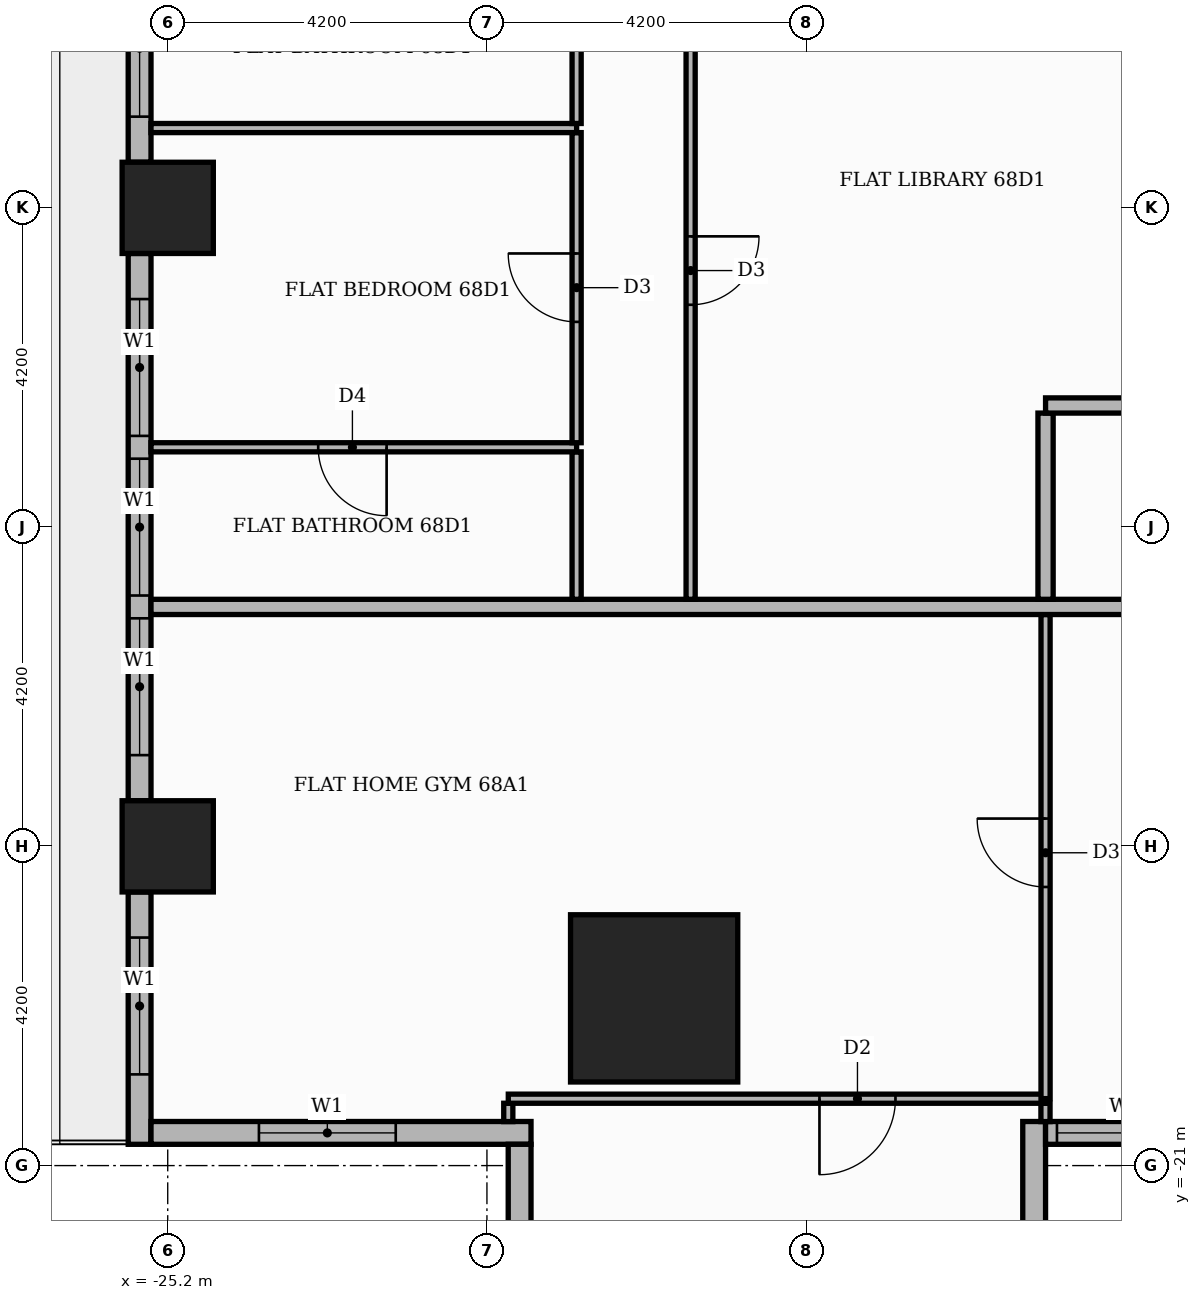
"""IFC4 building model, lengths in metres.
Left out: names, types, materials, properties, quantities, classifications, styles, units other than length and angle.
Written with IfcOpenShell. Run it as: python <this file> out.ifc"""

import sys

from ifc_helpers import new_model, si_unit, direction, frame, frame_2d, origin, origin_2d, place, context, subcontext, project, spatial, rectangle, extrude, element, fill, save


model = new_model("IFC4")
c1 = context("Model", 3, precision=1e-05, world=origin(), true_north=direction((0.0, 1.0)))
c2 = subcontext(c1, "Body", "Model", "MODEL_VIEW")
j1 = project(units=[si_unit("LENGTHUNIT", "METRE"), si_unit("PLANEANGLEUNIT", "RADIAN")], contexts=[c1])
p1 = place(None, origin())
s1 = spatial("IfcSite", under=j1, at=p1, CompositionType="ELEMENT")
p2 = place(p1, origin())
s2 = spatial("IfcBuilding", under=s1, at=p2, CompositionType="ELEMENT")
p3 = place(p2, frame((0.0, 0.0, 283.5)))
s3 = spatial("IfcBuildingStorey", under=s2, at=p3, CompositionType="ELEMENT", Elevation=283.5)
p4 = place(p3, frame((-18.8, -18.8, 0.0), z_axis=(0.0, 0.0, 1.0), x_axis=(1.0, 0.0, 0.0)))
e1 = element("IfcColumn", 1, at=p4, inside=s3, PredefinedType="COLUMN", context=c2, shape_type="SweptSolid", body=[
    extrude(rectangle(XDim=2.2, YDim=2.2, at=origin_2d()), origin(), (0.0, 0.0, 1.0), 3.9),
])
for number, where, z_axis, x_axis in (
    (2, (-25.2, -8.4, 0.0), (0.0, 0.0, 1.0), (1.0, 0.0, 0.0)),
    (3, (-25.2, -16.8, 0.0), (0.0, 0.0, 1.0), (1.0, 0.0, 0.0)),
):
    element("IfcColumn", number, at=place(p3, frame(where, z_axis=z_axis, x_axis=x_axis)), inside=s3, PredefinedType="COLUMN", context=c2, shape_type="SweptSolid", body=[
        extrude(rectangle(XDim=1.2, YDim=1.2, at=origin_2d()), origin(), (0.0, 0.0, 1.0), 3.9),
    ])
p5 = place(p3, frame((-25.57, -0.6, 0.0), z_axis=(0.0, 0.0, 1.0), x_axis=(0.0, -1.0, 0.0)))
e4 = element("IfcWall", 4, at=p5, inside=s3, PredefinedType="STANDARD", context=c2, shape_type="SweptSolid", body=[
    extrude(rectangle(XDim=7.2, YDim=0.3, at=frame_2d((3.6, 0.0))), origin(), (0.0, 0.0, 1.0), 3.4),
])
p6 = place(p5, frame((0.6, 0.0, 0.9)))
e5 = element("IfcOpeningElement", 5, at=p6, cuts=e4, PredefinedType="OPENING", context=c2, shape_type="SweptSolid", body=[
    extrude(rectangle(XDim=3.9, YDim=2.1, at=frame_2d((1.95, 1.05))), frame((0.0, 0.16, 0.0), z_axis=(0.0, -1.0, 0.0), x_axis=(1.0, 0.0, 0.0)), (0.0, 0.0, 1.0), 0.32),
])
p7 = place(p5, frame((4.8, 0.0, 0.9)))
e6 = element("IfcOpeningElement", 6, at=p7, cuts=e4, PredefinedType="OPENING", context=c2, shape_type="SweptSolid", body=[
    extrude(rectangle(XDim=1.8, YDim=2.1, at=frame_2d((0.9, 1.05))), frame((0.0, 0.16, 0.0), z_axis=(0.0, -1.0, 0.0), x_axis=(1.0, 0.0, 0.0)), (0.0, 0.0, 1.0), 0.32),
])
p8 = place(p3, frame((-25.57, -9.0, 0.0), z_axis=(0.0, 0.0, 1.0), x_axis=(0.0, -1.0, 0.0)))
e7 = element("IfcWall", 7, at=p8, inside=s3, PredefinedType="STANDARD", context=c2, shape_type="SweptSolid", body=[
    extrude(rectangle(XDim=7.2, YDim=0.3, at=frame_2d((3.6, 0.0))), origin(), (0.0, 0.0, 1.0), 3.4),
])
p9 = place(p8, frame((0.6, 0.0, 0.9)))
e8 = element("IfcOpeningElement", 8, at=p9, cuts=e7, PredefinedType="OPENING", context=c2, shape_type="SweptSolid", body=[
    extrude(rectangle(XDim=1.8, YDim=2.1, at=frame_2d((0.9, 1.05))), frame((0.0, 0.16, 0.0), z_axis=(0.0, -1.0, 0.0), x_axis=(1.0, 0.0, 0.0)), (0.0, 0.0, 1.0), 0.32),
])
p10 = place(p8, frame((2.7, 0.0, 0.9)))
e9 = element("IfcOpeningElement", 9, at=p10, cuts=e7, PredefinedType="OPENING", context=c2, shape_type="SweptSolid", body=[
    extrude(rectangle(XDim=1.8, YDim=2.1, at=frame_2d((0.9, 1.05))), frame((0.0, 0.16, 0.0), z_axis=(0.0, -1.0, 0.0), x_axis=(1.0, 0.0, 0.0)), (0.0, 0.0, 1.0), 0.32),
])
p11 = place(p8, frame((4.8, 0.0, 0.9)))
e10 = element("IfcOpeningElement", 10, at=p11, cuts=e7, PredefinedType="OPENING", context=c2, shape_type="SweptSolid", body=[
    extrude(rectangle(XDim=1.8, YDim=2.1, at=frame_2d((0.9, 1.05))), frame((0.0, 0.16, 0.0), z_axis=(0.0, -1.0, 0.0), x_axis=(1.0, 0.0, 0.0)), (0.0, 0.0, 1.0), 0.32),
])
p12 = place(p3, frame((-25.57, -17.4, 0.0), z_axis=(0.0, 0.0, 1.0), x_axis=(0.0, -1.0, 0.0)))
e11 = element("IfcWall", 11, at=p12, inside=s3, PredefinedType="STANDARD", context=c2, shape_type="SweptSolid", body=[
    extrude(rectangle(XDim=3.32, YDim=0.3, at=frame_2d((1.66, 0.0))), origin(), (0.0, 0.0, 1.0), 3.4),
])
p13 = place(p12, frame((0.6, 0.0, 0.9)))
e12 = element("IfcOpeningElement", 12, at=p13, cuts=e11, PredefinedType="OPENING", context=c2, shape_type="SweptSolid", body=[
    extrude(rectangle(XDim=1.8, YDim=2.1, at=frame_2d((0.9, 1.05))), frame((0.0, 0.16, 0.0), z_axis=(0.0, -1.0, 0.0), x_axis=(1.0, 0.0, 0.0)), (0.0, 0.0, 1.0), 0.32),
])
p14 = place(p3, frame((-25.42, -20.57, 0.0), z_axis=(0.0, 0.0, 1.0), x_axis=(1.0, 0.0, 0.0)))
e13 = element("IfcWall", 13, at=p14, inside=s3, PredefinedType="STANDARD", context=c2, shape_type="SweptSolid", body=[
    extrude(rectangle(XDim=5.0, YDim=0.3, at=frame_2d((2.5, 0.0))), origin(), (0.0, 0.0, 1.0), 3.4),
])
p15 = place(p14, frame((1.42, 0.0, 0.9)))
e14 = element("IfcOpeningElement", 14, at=p15, cuts=e13, PredefinedType="OPENING", context=c2, shape_type="SweptSolid", body=[
    extrude(rectangle(XDim=1.8, YDim=2.1, at=frame_2d((0.9, 1.05))), frame((0.0, 0.16, 0.0), z_axis=(0.0, -1.0, 0.0), x_axis=(1.0, 0.0, 0.0)), (0.0, 0.0, 1.0), 0.32),
])
p16 = place(p3, frame((-20.57, -20.72, 0.0), z_axis=(0.0, 0.0, 1.0), x_axis=(0.0, -1.0, 0.0)))
e15 = element("IfcWall", 15, at=p16, inside=s3, PredefinedType="STANDARD", context=c2, shape_type="SweptSolid", body=[
    extrude(rectangle(XDim=5.0, YDim=0.3, at=frame_2d((2.5, 0.0))), origin(), (0.0, 0.0, 1.0), 3.4),
])
p17 = place(p16, frame((1.48, 0.0, 0.9)))
e16 = element("IfcOpeningElement", 16, at=p17, cuts=e15, PredefinedType="OPENING", context=c2, shape_type="SweptSolid", body=[
    extrude(rectangle(XDim=1.8, YDim=2.1, at=frame_2d((0.9, 1.05))), frame((0.0, 0.16, 0.0), z_axis=(0.0, -1.0, 0.0), x_axis=(1.0, 0.0, 0.0)), (0.0, 0.0, 1.0), 0.32),
])
p18 = place(p3, frame((-13.8, -25.42, 0.0), z_axis=(0.0, 0.0, 1.0), x_axis=(0.0, 1.0, 0.0)))
e17 = element("IfcWall", 17, at=p18, inside=s3, PredefinedType="STANDARD", context=c2, shape_type="SweptSolid", body=[
    extrude(rectangle(XDim=5.0, YDim=0.3, at=frame_2d((2.5, 0.0))), origin(), (0.0, 0.0, 1.0), 3.4),
])
p19 = place(p18, frame((1.42, 0.0, 0.9)))
e18 = element("IfcOpeningElement", 18, at=p19, cuts=e17, PredefinedType="OPENING", context=c2, shape_type="SweptSolid", body=[
    extrude(rectangle(XDim=1.8, YDim=2.1, at=frame_2d((0.9, 1.05))), frame((0.0, 0.16, 0.0), z_axis=(0.0, -1.0, 0.0), x_axis=(1.0, 0.0, 0.0)), (0.0, 0.0, 1.0), 0.32),
])
p20 = place(p3, frame((-13.65, -20.57, 0.0), z_axis=(0.0, 0.0, 1.0), x_axis=(1.0, 0.0, 0.0)))
e19 = element("IfcWall", 19, at=p20, inside=s3, PredefinedType="STANDARD", context=c2, shape_type="SweptSolid", body=[
    extrude(rectangle(XDim=27.6, YDim=0.3, at=frame_2d((13.8, 0.0))), origin(), (0.0, 0.0, 1.0), 3.4),
])
p21 = place(p20, frame((0.15, 0.0, 0.9)))
e20 = element("IfcOpeningElement", 20, at=p21, cuts=e19, PredefinedType="OPENING", context=c2, shape_type="SweptSolid", body=[
    extrude(rectangle(XDim=1.8, YDim=2.1, at=frame_2d((0.9, 1.05))), frame((0.0, 0.16, 0.0), z_axis=(0.0, -1.0, 0.0), x_axis=(1.0, 0.0, 0.0)), (0.0, 0.0, 1.0), 0.32),
])
p22 = place(p20, frame((2.25, 0.0, 0.9)))
e21 = element("IfcOpeningElement", 21, at=p22, cuts=e19, PredefinedType="OPENING", context=c2, shape_type="SweptSolid", body=[
    extrude(rectangle(XDim=6.0, YDim=2.1, at=frame_2d((3.0, 1.05))), frame((0.0, 0.16, 0.0), z_axis=(0.0, -1.0, 0.0), x_axis=(1.0, 0.0, 0.0)), (0.0, 0.0, 1.0), 0.32),
])
p23 = place(p20, frame((8.55, 0.0, 0.9)))
e22 = element("IfcOpeningElement", 22, at=p23, cuts=e19, PredefinedType="OPENING", context=c2, shape_type="SweptSolid", body=[
    extrude(rectangle(XDim=6.0, YDim=2.1, at=frame_2d((3.0, 1.05))), frame((0.0, 0.16, 0.0), z_axis=(0.0, -1.0, 0.0), x_axis=(1.0, 0.0, 0.0)), (0.0, 0.0, 1.0), 0.32),
])
p24 = place(p20, frame((14.85, 0.0, 0.9)))
e23 = element("IfcOpeningElement", 23, at=p24, cuts=e19, PredefinedType="OPENING", context=c2, shape_type="SweptSolid", body=[
    extrude(rectangle(XDim=6.0, YDim=2.1, at=frame_2d((3.0, 1.05))), frame((0.0, 0.16, 0.0), z_axis=(0.0, -1.0, 0.0), x_axis=(1.0, 0.0, 0.0)), (0.0, 0.0, 1.0), 0.32),
])
p25 = place(p20, frame((21.15, 0.0, 0.9)))
e24 = element("IfcOpeningElement", 24, at=p25, cuts=e19, PredefinedType="OPENING", context=c2, shape_type="SweptSolid", body=[
    extrude(rectangle(XDim=6.0, YDim=2.1, at=frame_2d((3.0, 1.05))), frame((0.0, 0.16, 0.0), z_axis=(0.0, -1.0, 0.0), x_axis=(1.0, 0.0, 0.0)), (0.0, 0.0, 1.0), 0.32),
])
for number, where, z_axis, x_axis in (
    (25, (-20.719, -20.421, 0.0), (0.0, 0.0, 1.0), (0.0, 1.0, 0.0)),
    (26, (-13.651, -20.421, 0.0), (0.0, 0.0, 1.0), (0.0, 1.0, 0.0)),
):
    element("IfcWall", number, at=place(p3, frame(where, z_axis=z_axis, x_axis=x_axis)), inside=s3, PredefinedType="PARTITIONING", context=c2, shape_type="SweptSolid", body=[
        extrude(rectangle(XDim=0.241, YDim=0.12, at=frame_2d((0.121, 0.0))), origin(), (0.0, 0.0, 1.0), 3.4),
    ])
p26 = place(p3, frame((-20.719, -20.12, 0.0), z_axis=(0.0, 0.0, 1.0), x_axis=(1.0, 0.0, 0.0)))
e27 = element("IfcWall", 27, at=p26, inside=s3, PredefinedType="PARTITIONING", context=c2, shape_type="SweptSolid", body=[
    extrude(rectangle(XDim=7.068, YDim=0.12, at=frame_2d((3.534, 0.0))), origin(), (0.0, 0.0, 1.0), 3.4),
])
p27 = place(p26, frame((4.094, 0.0, 0.0)))
e28 = element("IfcOpeningElement", 28, at=p27, cuts=e27, PredefinedType="OPENING", context=c2, shape_type="SweptSolid", body=[
    extrude(rectangle(XDim=1.0, YDim=2.1, at=frame_2d((0.5, 1.05))), frame((0.0, 0.07, 0.0), z_axis=(0.0, -1.0, 0.0), x_axis=(1.0, 0.0, 0.0)), (0.0, 0.0, 1.0), 0.14),
])
p28 = place(p3, frame((-13.65, -20.119, 0.0), z_axis=(0.0, 0.0, 1.0), x_axis=(0.0, 1.0, 0.0)))
e29 = element("IfcWall", 29, at=p28, inside=s3, PredefinedType="PARTITIONING", context=c2, shape_type="SweptSolid", body=[
    extrude(rectangle(XDim=6.369, YDim=0.12, at=frame_2d((3.185, 0.0))), origin(), (0.0, 0.0, 1.0), 3.4),
])
p29 = place(p28, frame((2.784, 0.0, 0.0)))
e30 = element("IfcOpeningElement", 30, at=p29, cuts=e29, PredefinedType="OPENING", context=c2, shape_type="SweptSolid", body=[
    extrude(rectangle(XDim=0.9, YDim=2.1, at=frame_2d((0.45, 1.05))), frame((0.0, 0.07, 0.0), z_axis=(0.0, -1.0, 0.0), x_axis=(1.0, 0.0, 0.0)), (0.0, 0.0, 1.0), 0.14),
])
p30 = place(p3, frame((-25.42, -13.65, 0.0), z_axis=(0.0, 0.0, 1.0), x_axis=(1.0, 0.0, 0.0)))
e31 = element("IfcWall", 31, at=p30, inside=s3, PredefinedType="PARTITIONING", context=c2, shape_type="SweptSolid", body=[
    extrude(rectangle(XDim=39.07, YDim=0.2, at=frame_2d((19.535, 0.0))), origin(), (0.0, 0.0, 1.0), 3.4),
])
p31 = place(p30, frame((14.37, 0.0, 0.0)))
e32 = element("IfcOpeningElement", 32, at=p31, cuts=e31, PredefinedType="OPENING", context=c2, shape_type="SweptSolid", body=[
    extrude(rectangle(XDim=1.1, YDim=2.4, at=frame_2d((0.55, 1.2))), frame((0.0, 0.11, 0.0), z_axis=(0.0, -1.0, 0.0), x_axis=(1.0, 0.0, 0.0)), (0.0, 0.0, 1.0), 0.22),
])
p32 = place(p3, frame((-19.82, -13.55, 0.0), z_axis=(0.0, 0.0, 1.0), x_axis=(0.0, 1.0, 0.0)))
e33 = element("IfcWall", 33, at=p32, inside=s3, PredefinedType="PARTITIONING", context=c2, shape_type="SweptSolid", body=[
    extrude(rectangle(XDim=1.94, YDim=0.12, at=frame_2d((0.97, 0.0))), origin(), (0.0, 0.0, 1.0), 3.4),
])
p33 = place(p3, frame((-18.32, -13.55, 0.0), z_axis=(0.0, 0.0, 1.0), x_axis=(0.0, 1.0, 0.0)))
e34 = element("IfcWall", 34, at=p33, inside=s3, PredefinedType="PARTITIONING", context=c2, shape_type="SweptSolid", body=[
    extrude(rectangle(XDim=8.69, YDim=0.12, at=frame_2d((4.345, 0.0))), origin(), (0.0, 0.0, 1.0), 3.4),
])
p34 = place(p33, frame((3.875, 0.0, 0.0)))
e35 = element("IfcOpeningElement", 35, at=p34, cuts=e34, PredefinedType="OPENING", context=c2, shape_type="SweptSolid", body=[
    extrude(rectangle(XDim=0.9, YDim=2.1, at=frame_2d((0.45, 1.05))), frame((0.0, 0.07, 0.0), z_axis=(0.0, -1.0, 0.0), x_axis=(1.0, 0.0, 0.0)), (0.0, 0.0, 1.0), 0.14),
])
p35 = place(p3, frame((-13.65, -13.55, 0.0), z_axis=(0.0, 0.0, 1.0), x_axis=(0.0, 1.0, 0.0)))
e36 = element("IfcWall", 36, at=p35, inside=s3, PredefinedType="PARTITIONING", context=c2, shape_type="SweptSolid", body=[
    extrude(rectangle(XDim=2.45, YDim=0.2, at=frame_2d((1.225, 0.0))), origin(), (0.0, 0.0, 1.0), 3.4),
])
p36 = place(p3, frame((-25.42, -11.55, 0.0), z_axis=(0.0, 0.0, 1.0), x_axis=(1.0, 0.0, 0.0)))
e37 = element("IfcWall", 37, at=p36, inside=s3, PredefinedType="PARTITIONING", context=c2, shape_type="SweptSolid", body=[
    extrude(rectangle(XDim=5.6, YDim=0.12, at=frame_2d((2.8, 0.0))), origin(), (0.0, 0.0, 1.0), 3.4),
])
p37 = place(p36, frame((2.2, 0.0, 0.0)))
e38 = element("IfcOpeningElement", 38, at=p37, cuts=e37, PredefinedType="OPENING", context=c2, shape_type="SweptSolid", body=[
    extrude(rectangle(XDim=0.9, YDim=2.1, at=frame_2d((0.45, 1.05))), frame((0.0, 0.07, 0.0), z_axis=(0.0, -1.0, 0.0), x_axis=(1.0, 0.0, 0.0)), (0.0, 0.0, 1.0), 0.14),
])
p38 = place(p3, frame((-19.82, -11.49, 0.0), z_axis=(0.0, 0.0, 1.0), x_axis=(0.0, 1.0, 0.0)))
e39 = element("IfcWall", 39, at=p38, inside=s3, PredefinedType="PARTITIONING", context=c2, shape_type="SweptSolid", body=[
    extrude(rectangle(XDim=4.08, YDim=0.12, at=frame_2d((2.04, 0.0))), origin(), (0.0, 0.0, 1.0), 3.4),
])
p39 = place(p38, frame((1.59, 0.0, 0.0)))
e40 = element("IfcOpeningElement", 40, at=p39, cuts=e39, PredefinedType="OPENING", context=c2, shape_type="SweptSolid", body=[
    extrude(rectangle(XDim=0.9, YDim=2.1, at=frame_2d((0.45, 1.05))), frame((0.0, 0.07, 0.0), z_axis=(0.0, -1.0, 0.0), x_axis=(1.0, 0.0, 0.0)), (0.0, 0.0, 1.0), 0.14),
])
p40 = place(p3, frame((-13.65, -11.0, 0.0), z_axis=(0.0, 0.0, 1.0), x_axis=(1.0, 0.0, 0.0)))
e41 = element("IfcWall", 41, at=p40, inside=s3, PredefinedType="PARTITIONING", context=c2, shape_type="SweptSolid", body=[
    extrude(rectangle(XDim=2.65, YDim=0.2, at=frame_2d((1.325, 0.0))), origin(), (0.0, 0.0, 1.0), 3.4),
])
p41 = place(p3, frame((-25.42, -7.35, 0.0), z_axis=(0.0, 0.0, 1.0), x_axis=(1.0, 0.0, 0.0)))
e42 = element("IfcWall", 42, at=p41, inside=s3, PredefinedType="PARTITIONING", context=c2, shape_type="SweptSolid", body=[
    extrude(rectangle(XDim=5.6, YDim=0.12, at=frame_2d((2.8, 0.0))), origin(), (0.0, 0.0, 1.0), 3.4),
])
p42 = place(p3, frame((-19.82, -7.29, 0.0), z_axis=(0.0, 0.0, 1.0), x_axis=(0.0, 1.0, 0.0)))
e43 = element("IfcWall", 43, at=p42, inside=s3, PredefinedType="PARTITIONING", context=c2, shape_type="SweptSolid", body=[
    extrude(rectangle(XDim=1.98, YDim=0.12, at=frame_2d((0.99, 0.0))), origin(), (0.0, 0.0, 1.0), 3.4),
])
p43 = place(p7, origin())
e44 = element("IfcWindow", 44, at=p43, inside=s3, PartitioningType="SINGLE_PANEL", PredefinedType="WINDOW", context=c2, shape_type="SweptSolid", body=[
    extrude(rectangle(XDim=1.8, YDim=2.1, at=frame_2d((0.9, 1.05))), frame((0.0, 0.03, 0.0), z_axis=(0.0, -1.0, 0.0), x_axis=(1.0, 0.0, 0.0)), (0.0, 0.0, 1.0), 0.06),
])
fill(e6, e44)
p44 = place(p9, origin())
e45 = element("IfcWindow", 45, at=p44, inside=s3, PartitioningType="SINGLE_PANEL", PredefinedType="WINDOW", context=c2, shape_type="SweptSolid", body=[
    extrude(rectangle(XDim=1.8, YDim=2.1, at=frame_2d((0.9, 1.05))), frame((0.0, 0.03, 0.0), z_axis=(0.0, -1.0, 0.0), x_axis=(1.0, 0.0, 0.0)), (0.0, 0.0, 1.0), 0.06),
])
fill(e8, e45)
p45 = place(p10, origin())
e46 = element("IfcWindow", 46, at=p45, inside=s3, PartitioningType="SINGLE_PANEL", PredefinedType="WINDOW", context=c2, shape_type="SweptSolid", body=[
    extrude(rectangle(XDim=1.8, YDim=2.1, at=frame_2d((0.9, 1.05))), frame((0.0, 0.03, 0.0), z_axis=(0.0, -1.0, 0.0), x_axis=(1.0, 0.0, 0.0)), (0.0, 0.0, 1.0), 0.06),
])
fill(e9, e46)
p46 = place(p11, origin())
e47 = element("IfcWindow", 47, at=p46, inside=s3, PartitioningType="SINGLE_PANEL", PredefinedType="WINDOW", context=c2, shape_type="SweptSolid", body=[
    extrude(rectangle(XDim=1.8, YDim=2.1, at=frame_2d((0.9, 1.05))), frame((0.0, 0.03, 0.0), z_axis=(0.0, -1.0, 0.0), x_axis=(1.0, 0.0, 0.0)), (0.0, 0.0, 1.0), 0.06),
])
fill(e10, e47)
p47 = place(p13, origin())
e48 = element("IfcWindow", 48, at=p47, inside=s3, PartitioningType="SINGLE_PANEL", PredefinedType="WINDOW", context=c2, shape_type="SweptSolid", body=[
    extrude(rectangle(XDim=1.8, YDim=2.1, at=frame_2d((0.9, 1.05))), frame((0.0, 0.03, 0.0), z_axis=(0.0, -1.0, 0.0), x_axis=(1.0, 0.0, 0.0)), (0.0, 0.0, 1.0), 0.06),
])
fill(e12, e48)
p48 = place(p15, origin())
e49 = element("IfcWindow", 49, at=p48, inside=s3, PartitioningType="SINGLE_PANEL", PredefinedType="WINDOW", context=c2, shape_type="SweptSolid", body=[
    extrude(rectangle(XDim=1.8, YDim=2.1, at=frame_2d((0.9, 1.05))), frame((0.0, 0.03, 0.0), z_axis=(0.0, -1.0, 0.0), x_axis=(1.0, 0.0, 0.0)), (0.0, 0.0, 1.0), 0.06),
])
fill(e14, e49)
p49 = place(p21, origin())
e50 = element("IfcWindow", 50, at=p49, inside=s3, PartitioningType="SINGLE_PANEL", PredefinedType="WINDOW", context=c2, shape_type="SweptSolid", body=[
    extrude(rectangle(XDim=1.8, YDim=2.1, at=frame_2d((0.9, 1.05))), frame((0.0, 0.03, 0.0), z_axis=(0.0, -1.0, 0.0), x_axis=(1.0, 0.0, 0.0)), (0.0, 0.0, 1.0), 0.06),
])
fill(e20, e50)
p50 = place(p29, origin())
e51 = element("IfcDoor", 51, at=p50, inside=s3, OperationType="SINGLE_SWING_RIGHT", PredefinedType="DOOR", context=c2, shape_type="SweptSolid", body=[
    extrude(rectangle(XDim=0.9, YDim=2.1, at=frame_2d((0.45, 1.05))), frame((0.0, 0.025, 0.0), z_axis=(0.0, -1.0, 0.0), x_axis=(1.0, 0.0, 0.0)), (0.0, 0.0, 1.0), 0.05),
])
fill(e30, e51)
p51 = place(p27, frame((1.0, 0.0, 0.0), z_axis=(0.0, 0.0, 1.0), x_axis=(-1.0, 0.0, 0.0)))
e52 = element("IfcDoor", 52, at=p51, inside=s3, OperationType="SINGLE_SWING_LEFT", PredefinedType="DOOR", context=c2, shape_type="SweptSolid", body=[
    extrude(rectangle(XDim=1.0, YDim=2.1, at=frame_2d((0.5, 1.05))), frame((0.0, 0.025, 0.0), z_axis=(0.0, -1.0, 0.0), x_axis=(1.0, 0.0, 0.0)), (0.0, 0.0, 1.0), 0.05),
])
fill(e28, e52)
p52 = place(p34, frame((0.9, 0.0, 0.0), z_axis=(0.0, 0.0, 1.0), x_axis=(-1.0, 0.0, 0.0)))
e53 = element("IfcDoor", 53, at=p52, inside=s3, OperationType="SINGLE_SWING_RIGHT", PredefinedType="DOOR", context=c2, shape_type="SweptSolid", body=[
    extrude(rectangle(XDim=0.9, YDim=2.1, at=frame_2d((0.45, 1.05))), frame((0.0, 0.025, 0.0), z_axis=(0.0, -1.0, 0.0), x_axis=(1.0, 0.0, 0.0)), (0.0, 0.0, 1.0), 0.05),
])
fill(e35, e53)
p53 = place(p39, origin())
e54 = element("IfcDoor", 54, at=p53, inside=s3, OperationType="SINGLE_SWING_RIGHT", PredefinedType="DOOR", context=c2, shape_type="SweptSolid", body=[
    extrude(rectangle(XDim=0.9, YDim=2.1, at=frame_2d((0.45, 1.05))), frame((0.0, 0.025, 0.0), z_axis=(0.0, -1.0, 0.0), x_axis=(1.0, 0.0, 0.0)), (0.0, 0.0, 1.0), 0.05),
])
fill(e40, e54)
p54 = place(p37, frame((0.9, 0.0, 0.0), z_axis=(0.0, 0.0, 1.0), x_axis=(-1.0, 0.0, 0.0)))
e55 = element("IfcDoor", 55, at=p54, inside=s3, OperationType="SINGLE_SWING_RIGHT", PredefinedType="DOOR", context=c2, shape_type="SweptSolid", body=[
    extrude(rectangle(XDim=0.9, YDim=2.1, at=frame_2d((0.45, 1.05))), frame((0.0, 0.025, 0.0), z_axis=(0.0, -1.0, 0.0), x_axis=(1.0, 0.0, 0.0)), (0.0, 0.0, 1.0), 0.05),
])
fill(e38, e55)
save(model, sys.argv[1])
